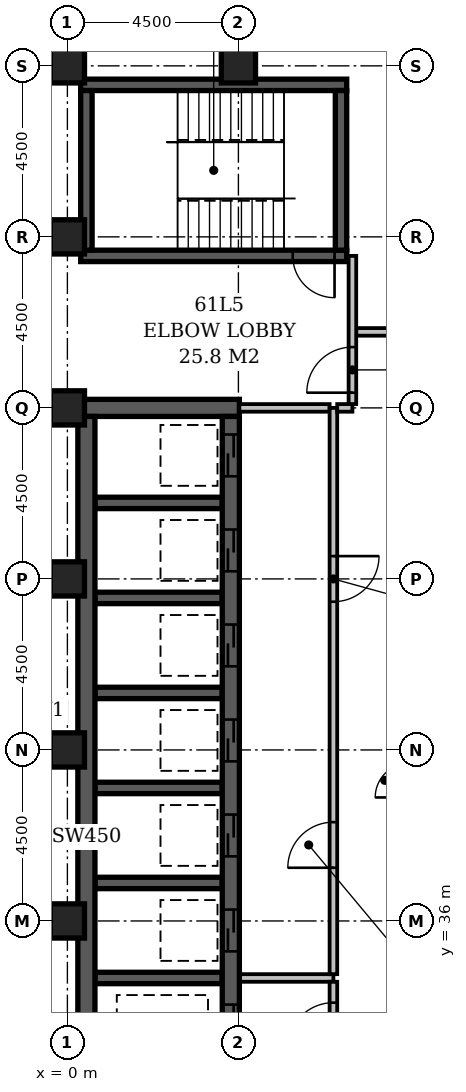
"""IFC4 building model, lengths in metres.
Left out: names, types, materials, properties, quantities, classifications, styles, units other than length and angle.
Written with IfcOpenShell. Run it as: python <this file> out.ifc"""

import sys

from ifc_helpers import new_model, si_unit, direction, frame, frame_2d, origin, origin_2d, place, context, subcontext, project, spatial, rectangle, extrude, element, fill, save


model = new_model("IFC4")
c1 = context("Model", 3, precision=1e-05, world=origin(), true_north=direction((0.0, 1.0)))
c2 = subcontext(c1, "Body", "Model", "MODEL_VIEW")
j1 = project(units=[si_unit("LENGTHUNIT", "METRE"), si_unit("PLANEANGLEUNIT", "RADIAN")], contexts=[c1])
p1 = place(None, origin())
s1 = spatial("IfcSite", under=j1, at=p1, CompositionType="ELEMENT")
p2 = place(p1, origin())
s2 = spatial("IfcBuilding", under=s1, at=p2, CompositionType="ELEMENT")
p3 = place(p2, frame((0.0, 0.0, 236.6)))
s3 = spatial("IfcBuildingStorey", under=s2, at=p3, CompositionType="ELEMENT", Elevation=236.6)
p4 = place(p3, frame((0.275, 49.5, -0.3), z_axis=(0.0, 0.0, 1.0), x_axis=(1.0, 0.0, 0.0)))
e1 = element("IfcWall", 1, at=p4, inside=s3, PredefinedType="SHEAR", context=c2, shape_type="SweptSolid", body=[
    extrude(rectangle(XDim=4.25, YDim=0.45, at=frame_2d((2.125, 0.0))), origin(), (0.0, 0.0, 1.0), 3.6),
])
p5 = place(p3, frame((0.35, 53.5, -0.3), z_axis=(0.0, 0.0, 1.0), x_axis=(1.0, 0.0, 0.0)))
e2 = element("IfcWall", 2, at=p5, inside=s3, PredefinedType="SHEAR", context=c2, shape_type="SweptSolid", body=[
    extrude(rectangle(XDim=7.0, YDim=0.3, at=frame_2d((3.5, 0.0))), origin(), (0.0, 0.0, 1.0), 3.6),
])
p6 = place(p5, frame((5.58, 0.0, 0.3)))
e3 = element("IfcOpeningElement", 3, at=p6, cuts=e2, PredefinedType="OPENING", context=c2, shape_type="SweptSolid", body=[
    extrude(rectangle(XDim=1.1, YDim=2.1, at=frame_2d((0.55, 1.05))), frame((0.0, 0.162, 0.0), z_axis=(0.0, -1.0, 0.0), x_axis=(1.0, 0.0, 0.0)), (0.0, 0.0, 1.0), 0.324),
])
p7 = place(p3, frame((0.35, 58.0, -0.3), z_axis=(0.0, 0.0, 1.0), x_axis=(1.0, 0.0, 0.0)))
e4 = element("IfcWall", 4, at=p7, inside=s3, PredefinedType="SHEAR", context=c2, shape_type="SweptSolid", body=[
    extrude(rectangle(XDim=7.0, YDim=0.3, at=frame_2d((3.5, 0.0))), origin(), (0.0, 0.0, 1.0), 3.6),
])
p8 = place(p3, frame((0.5, 27.15, -0.3), z_axis=(0.0, 0.0, 1.0), x_axis=(0.0, 1.0, 0.0)))
e5 = element("IfcWall", 5, at=p8, inside=s3, PredefinedType="SHEAR", context=c2, shape_type="SweptSolid", body=[
    extrude(rectangle(XDim=22.125, YDim=0.45, at=frame_2d((11.062, 0.0))), origin(), (0.0, 0.0, 1.0), 3.6),
])
p9 = place(p3, frame((0.5, 53.65, -0.3), z_axis=(0.0, 0.0, 1.0), x_axis=(0.0, 1.0, 0.0)))
e6 = element("IfcWall", 6, at=p9, inside=s3, PredefinedType="SHEAR", context=c2, shape_type="SweptSolid", body=[
    extrude(rectangle(XDim=4.2, YDim=0.3, at=frame_2d((2.1, 0.0))), origin(), (0.0, 0.0, 1.0), 3.6),
])
for number, where, z_axis, x_axis in (
    (7, (0.725, 34.5, -0.3), (0.0, 0.0, 1.0), (1.0, 0.0, 0.0)),
    (8, (0.725, 37.0, -0.3), (0.0, 0.0, 1.0), (1.0, 0.0, 0.0)),
    (9, (0.725, 39.5, -0.3), (0.0, 0.0, 1.0), (1.0, 0.0, 0.0)),
    (10, (0.725, 42.0, -0.3), (0.0, 0.0, 1.0), (1.0, 0.0, 0.0)),
    (11, (0.725, 44.5, -0.3), (0.0, 0.0, 1.0), (1.0, 0.0, 0.0)),
    (12, (0.725, 47.0, -0.3), (0.0, 0.0, 1.0), (1.0, 0.0, 0.0)),
):
    element("IfcWall", number, at=place(p3, frame(where, z_axis=z_axis, x_axis=x_axis)), inside=s3, PredefinedType="SHEAR", context=c2, shape_type="SweptSolid", body=[
        extrude(rectangle(XDim=3.35, YDim=0.3, at=frame_2d((1.675, 0.0))), origin(), (0.0, 0.0, 1.0), 3.6),
    ])
p10 = place(p3, frame((4.3, 27.15, -0.3), z_axis=(0.0, 0.0, 1.0), x_axis=(0.0, 1.0, 0.0)))
e13 = element("IfcWall", 13, at=p10, inside=s3, PredefinedType="SHEAR", context=c2, shape_type="SweptSolid", body=[
    extrude(rectangle(XDim=22.125, YDim=0.45, at=frame_2d((11.062, 0.0))), origin(), (0.0, 0.0, 1.0), 3.6),
])
p11 = place(p10, frame((3.05, 0.0, 0.3)))
e14 = element("IfcOpeningElement", 14, at=p11, cuts=e13, PredefinedType="OPENING", context=c2, shape_type="SweptSolid", body=[
    extrude(rectangle(XDim=1.1, YDim=2.1, at=frame_2d((0.55, 1.05))), frame((0.0, 0.237, 0.0), z_axis=(0.0, -1.0, 0.0), x_axis=(1.0, 0.0, 0.0)), (0.0, 0.0, 1.0), 0.474),
])
p12 = place(p10, frame((0.55, 0.0, 0.3)))
e15 = element("IfcOpeningElement", 15, at=p12, cuts=e13, PredefinedType="OPENING", context=c2, shape_type="SweptSolid", body=[
    extrude(rectangle(XDim=1.1, YDim=2.1, at=frame_2d((0.55, 1.05))), frame((0.0, 0.237, 0.0), z_axis=(0.0, -1.0, 0.0), x_axis=(1.0, 0.0, 0.0)), (0.0, 0.0, 1.0), 0.474),
])
p13 = place(p10, frame((20.55, 0.0, 0.3)))
e16 = element("IfcOpeningElement", 16, at=p13, cuts=e13, PredefinedType="OPENING", context=c2, shape_type="SweptSolid", body=[
    extrude(rectangle(XDim=1.1, YDim=2.1, at=frame_2d((0.55, 1.05))), frame((0.0, 0.237, 0.0), z_axis=(0.0, -1.0, 0.0), x_axis=(1.0, 0.0, 0.0)), (0.0, 0.0, 1.0), 0.474),
])
p14 = place(p10, frame((18.05, 0.0, 0.3)))
e17 = element("IfcOpeningElement", 17, at=p14, cuts=e13, PredefinedType="OPENING", context=c2, shape_type="SweptSolid", body=[
    extrude(rectangle(XDim=1.1, YDim=2.1, at=frame_2d((0.55, 1.05))), frame((0.0, 0.237, 0.0), z_axis=(0.0, -1.0, 0.0), x_axis=(1.0, 0.0, 0.0)), (0.0, 0.0, 1.0), 0.474),
])
p15 = place(p10, frame((15.55, 0.0, 0.3)))
e18 = element("IfcOpeningElement", 18, at=p15, cuts=e13, PredefinedType="OPENING", context=c2, shape_type="SweptSolid", body=[
    extrude(rectangle(XDim=1.1, YDim=2.1, at=frame_2d((0.55, 1.05))), frame((0.0, 0.237, 0.0), z_axis=(0.0, -1.0, 0.0), x_axis=(1.0, 0.0, 0.0)), (0.0, 0.0, 1.0), 0.474),
])
p16 = place(p10, frame((13.05, 0.0, 0.3)))
e19 = element("IfcOpeningElement", 19, at=p16, cuts=e13, PredefinedType="OPENING", context=c2, shape_type="SweptSolid", body=[
    extrude(rectangle(XDim=1.1, YDim=2.1, at=frame_2d((0.55, 1.05))), frame((0.0, 0.237, 0.0), z_axis=(0.0, -1.0, 0.0), x_axis=(1.0, 0.0, 0.0)), (0.0, 0.0, 1.0), 0.474),
])
p17 = place(p10, frame((10.55, 0.0, 0.3)))
e20 = element("IfcOpeningElement", 20, at=p17, cuts=e13, PredefinedType="OPENING", context=c2, shape_type="SweptSolid", body=[
    extrude(rectangle(XDim=1.1, YDim=2.1, at=frame_2d((0.55, 1.05))), frame((0.0, 0.237, 0.0), z_axis=(0.0, -1.0, 0.0), x_axis=(1.0, 0.0, 0.0)), (0.0, 0.0, 1.0), 0.474),
])
p18 = place(p10, frame((8.05, 0.0, 0.3)))
e21 = element("IfcOpeningElement", 21, at=p18, cuts=e13, PredefinedType="OPENING", context=c2, shape_type="SweptSolid", body=[
    extrude(rectangle(XDim=1.1, YDim=2.1, at=frame_2d((0.55, 1.05))), frame((0.0, 0.237, 0.0), z_axis=(0.0, -1.0, 0.0), x_axis=(1.0, 0.0, 0.0)), (0.0, 0.0, 1.0), 0.474),
])
p19 = place(p10, frame((5.55, 0.0, 0.3)))
e22 = element("IfcOpeningElement", 22, at=p19, cuts=e13, PredefinedType="OPENING", context=c2, shape_type="SweptSolid", body=[
    extrude(rectangle(XDim=1.1, YDim=2.1, at=frame_2d((0.55, 1.05))), frame((0.0, 0.237, 0.0), z_axis=(0.0, -1.0, 0.0), x_axis=(1.0, 0.0, 0.0)), (0.0, 0.0, 1.0), 0.474),
])
p20 = place(p3, frame((7.2, 53.65, -0.3), z_axis=(0.0, 0.0, 1.0), x_axis=(0.0, 1.0, 0.0)))
e23 = element("IfcWall", 23, at=p20, inside=s3, PredefinedType="SHEAR", context=c2, shape_type="SweptSolid", body=[
    extrude(rectangle(XDim=4.2, YDim=0.3, at=frame_2d((2.1, 0.0))), origin(), (0.0, 0.0, 1.0), 3.6),
])
for number, where, z_axis, x_axis in (
    (24, (0.0, 36.0, -0.3), (0.0, 0.0, 1.0), (1.0, 0.0, 0.0)),
    (25, (0.0, 40.5, -0.3), (0.0, 0.0, 1.0), (1.0, 0.0, 0.0)),
    (26, (0.0, 45.0, -0.3), (0.0, 0.0, 1.0), (1.0, 0.0, 0.0)),
    (27, (0.0, 49.5, -0.3), (0.0, 0.0, 1.0), (1.0, 0.0, 0.0)),
    (28, (0.0, 54.0, -0.3), (0.0, 0.0, 1.0), (1.0, 0.0, 0.0)),
    (29, (0.0, 58.5, -0.3), (0.0, 0.0, 1.0), (1.0, 0.0, 0.0)),
    (30, (4.5, 58.5, -0.3), (0.0, 0.0, 1.0), (1.0, 0.0, 0.0)),
):
    element("IfcColumn", number, at=place(p3, frame(where, z_axis=z_axis, x_axis=x_axis)), inside=s3, PredefinedType="COLUMN", context=c2, shape_type="SweptSolid", body=[
        extrude(rectangle(XDim=0.9, YDim=0.9, at=origin_2d()), origin(), (0.0, 0.0, 1.0), 3.6),
    ])
p21 = place(p3, frame((4.545, 34.5, 0.0), z_axis=(0.0, 0.0, 1.0), x_axis=(1.0, 0.0, 0.0)))
e31 = element("IfcWall", 31, at=p21, inside=s3, PredefinedType="PARTITIONING", context=c2, shape_type="SweptSolid", body=[
    extrude(rectangle(XDim=2.455, YDim=0.2, at=frame_2d((1.228, 0.0))), origin(), (0.0, 0.0, 1.0), 3.3),
])
p22 = place(p3, frame((7.0, 34.6, 0.0), z_axis=(0.0, 0.0, 1.0), x_axis=(0.0, 1.0, 0.0)))
e32 = element("IfcWall", 32, at=p22, inside=s3, PredefinedType="PARTITIONING", context=c2, shape_type="SweptSolid", body=[
    extrude(rectangle(XDim=14.9, YDim=0.2, at=frame_2d((7.45, 0.0))), origin(), (0.0, 0.0, 1.0), 3.3),
])
p23 = place(p22, frame((2.8, 0.0, 0.0)))
e33 = element("IfcOpeningElement", 33, at=p23, cuts=e32, PredefinedType="OPENING", context=c2, shape_type="SweptSolid", body=[
    extrude(rectangle(XDim=1.2, YDim=2.1, at=frame_2d((0.6, 1.05))), frame((0.0, 0.112, 0.0), z_axis=(0.0, -1.0, 0.0), x_axis=(1.0, 0.0, 0.0)), (0.0, 0.0, 1.0), 0.224),
])
p24 = place(p22, frame((9.8, 0.0, 0.0)))
e34 = element("IfcOpeningElement", 34, at=p24, cuts=e32, PredefinedType="OPENING", context=c2, shape_type="SweptSolid", body=[
    extrude(rectangle(XDim=1.2, YDim=2.1, at=frame_2d((0.6, 1.05))), frame((0.0, 0.112, 0.0), z_axis=(0.0, -1.0, 0.0), x_axis=(1.0, 0.0, 0.0)), (0.0, 0.0, 1.0), 0.224),
])
p25 = place(p3, frame((4.525, 49.5, 0.0), z_axis=(0.0, 0.0, 1.0), x_axis=(1.0, 0.0, 0.0)))
e35 = element("IfcWall", 35, at=p25, inside=s3, PredefinedType="PARTITIONING", context=c2, shape_type="SweptSolid", body=[
    extrude(rectangle(XDim=2.375, YDim=0.2, at=frame_2d((1.188, 0.0))), origin(), (0.0, 0.0, 1.0), 3.3),
])
p26 = place(p3, frame((7.0, 32.1, 0.0), z_axis=(0.0, 0.0, 1.0), x_axis=(0.0, 1.0, 0.0)))
e36 = element("IfcWall", 36, at=p26, inside=s3, PredefinedType="PARTITIONING", context=c2, shape_type="SweptSolid", body=[
    extrude(rectangle(XDim=2.3, YDim=0.2, at=frame_2d((1.15, 0.0))), origin(), (0.0, 0.0, 1.0), 3.3),
])
p27 = place(p26, frame((0.55, 0.0, 0.0)))
e37 = element("IfcOpeningElement", 37, at=p27, cuts=e36, PredefinedType="OPENING", context=c2, shape_type="SweptSolid", body=[
    extrude(rectangle(XDim=1.2, YDim=2.1, at=frame_2d((0.6, 1.05))), frame((0.0, 0.112, 0.0), z_axis=(0.0, -1.0, 0.0), x_axis=(1.0, 0.0, 0.0)), (0.0, 0.0, 1.0), 0.224),
])
p28 = place(p3, frame((7.1, 49.5, 0.0), z_axis=(0.0, 0.0, 1.0), x_axis=(1.0, 0.0, 0.0)))
e38 = element("IfcWall", 38, at=p28, inside=s3, PredefinedType="PARTITIONING", context=c2, shape_type="SweptSolid", body=[
    extrude(rectangle(XDim=0.4, YDim=0.2, at=frame_2d((0.2, 0.0))), origin(), (0.0, 0.0, 1.0), 3.3),
])
p29 = place(p3, frame((7.5, 49.6, 0.0), z_axis=(0.0, 0.0, 1.0), x_axis=(0.0, 1.0, 0.0)))
e39 = element("IfcWall", 39, at=p29, inside=s3, PredefinedType="PARTITIONING", context=c2, shape_type="SweptSolid", body=[
    extrude(rectangle(XDim=3.9, YDim=0.2, at=frame_2d((1.95, 0.0))), origin(), (0.0, 0.0, 1.0), 3.3),
])
p30 = place(p29, frame((0.3, 0.0, 0.0)))
e40 = element("IfcOpeningElement", 40, at=p30, cuts=e39, PredefinedType="OPENING", context=c2, shape_type="SweptSolid", body=[
    extrude(rectangle(XDim=1.2, YDim=2.1, at=frame_2d((0.6, 1.05))), frame((0.0, 0.112, 0.0), z_axis=(0.0, -1.0, 0.0), x_axis=(1.0, 0.0, 0.0)), (0.0, 0.0, 1.0), 0.224),
])
p31 = place(p3, frame((7.6, 51.5, 0.0), z_axis=(0.0, 0.0, 1.0), x_axis=(1.0, 0.0, 0.0)))
e41 = element("IfcWall", 41, at=p31, inside=s3, PredefinedType="PARTITIONING", context=c2, shape_type="SweptSolid", body=[
    extrude(rectangle(XDim=15.3, YDim=0.2, at=frame_2d((7.65, 0.0))), origin(), (0.0, 0.0, 1.0), 3.3),
])
p32 = place(p31, frame((7.2, 0.0, 0.0)))
e42 = element("IfcOpeningElement", 42, at=p32, cuts=e41, PredefinedType="OPENING", context=c2, shape_type="SweptSolid", body=[
    extrude(rectangle(XDim=0.9, YDim=2.1, at=frame_2d((0.45, 1.05))), frame((0.0, 0.112, 0.0), z_axis=(0.0, -1.0, 0.0), x_axis=(1.0, 0.0, 0.0)), (0.0, 0.0, 1.0), 0.224),
])
p33 = place(p30, origin())
e43 = element("IfcDoor", 43, at=p33, inside=s3, OperationType="SINGLE_SWING_LEFT", PredefinedType="DOOR", context=c2, shape_type="SweptSolid", body=[
    extrude(rectangle(XDim=1.2, YDim=2.1, at=frame_2d((0.6, 1.05))), frame((0.0, 0.025, 0.0), z_axis=(0.0, -1.0, 0.0), x_axis=(1.0, 0.0, 0.0)), (0.0, 0.0, 1.0), 0.05),
])
fill(e40, e43)
p34 = place(p13, origin())
e44 = element("IfcDoor", 44, at=p34, inside=s3, OperationType="SLIDING_TO_LEFT", PredefinedType="DOOR", context=c2, shape_type="SweptSolid", body=[
    extrude(rectangle(XDim=1.1, YDim=2.1, at=frame_2d((0.55, 1.05))), frame((0.0, 0.025, 0.0), z_axis=(0.0, -1.0, 0.0), x_axis=(1.0, 0.0, 0.0)), (0.0, 0.0, 1.0), 0.05),
])
fill(e16, e44)
p35 = place(p14, origin())
e45 = element("IfcDoor", 45, at=p35, inside=s3, OperationType="SLIDING_TO_LEFT", PredefinedType="DOOR", context=c2, shape_type="SweptSolid", body=[
    extrude(rectangle(XDim=1.1, YDim=2.1, at=frame_2d((0.55, 1.05))), frame((0.0, 0.025, 0.0), z_axis=(0.0, -1.0, 0.0), x_axis=(1.0, 0.0, 0.0)), (0.0, 0.0, 1.0), 0.05),
])
fill(e17, e45)
p36 = place(p15, origin())
e46 = element("IfcDoor", 46, at=p36, inside=s3, OperationType="SLIDING_TO_LEFT", PredefinedType="DOOR", context=c2, shape_type="SweptSolid", body=[
    extrude(rectangle(XDim=1.1, YDim=2.1, at=frame_2d((0.55, 1.05))), frame((0.0, 0.025, 0.0), z_axis=(0.0, -1.0, 0.0), x_axis=(1.0, 0.0, 0.0)), (0.0, 0.0, 1.0), 0.05),
])
fill(e18, e46)
p37 = place(p16, origin())
e47 = element("IfcDoor", 47, at=p37, inside=s3, OperationType="SLIDING_TO_LEFT", PredefinedType="DOOR", context=c2, shape_type="SweptSolid", body=[
    extrude(rectangle(XDim=1.1, YDim=2.1, at=frame_2d((0.55, 1.05))), frame((0.0, 0.025, 0.0), z_axis=(0.0, -1.0, 0.0), x_axis=(1.0, 0.0, 0.0)), (0.0, 0.0, 1.0), 0.05),
])
fill(e19, e47)
p38 = place(p17, origin())
e48 = element("IfcDoor", 48, at=p38, inside=s3, OperationType="SLIDING_TO_LEFT", PredefinedType="DOOR", context=c2, shape_type="SweptSolid", body=[
    extrude(rectangle(XDim=1.1, YDim=2.1, at=frame_2d((0.55, 1.05))), frame((0.0, 0.025, 0.0), z_axis=(0.0, -1.0, 0.0), x_axis=(1.0, 0.0, 0.0)), (0.0, 0.0, 1.0), 0.05),
])
fill(e20, e48)
p39 = place(p18, origin())
e49 = element("IfcDoor", 49, at=p39, inside=s3, OperationType="SLIDING_TO_LEFT", PredefinedType="DOOR", context=c2, shape_type="SweptSolid", body=[
    extrude(rectangle(XDim=1.1, YDim=2.1, at=frame_2d((0.55, 1.05))), frame((0.0, 0.025, 0.0), z_axis=(0.0, -1.0, 0.0), x_axis=(1.0, 0.0, 0.0)), (0.0, 0.0, 1.0), 0.05),
])
fill(e21, e49)
p40 = place(p23, origin())
e50 = element("IfcDoor", 50, at=p40, inside=s3, OperationType="SINGLE_SWING_LEFT", PredefinedType="DOOR", context=c2, shape_type="SweptSolid", body=[
    extrude(rectangle(XDim=1.2, YDim=2.1, at=frame_2d((0.6, 1.05))), frame((0.0, 0.025, 0.0), z_axis=(0.0, -1.0, 0.0), x_axis=(1.0, 0.0, 0.0)), (0.0, 0.0, 1.0), 0.05),
])
fill(e33, e50)
p41 = place(p24, origin())
e51 = element("IfcDoor", 51, at=p41, inside=s3, OperationType="SINGLE_SWING_RIGHT", PredefinedType="DOOR", context=c2, shape_type="SweptSolid", body=[
    extrude(rectangle(XDim=1.2, YDim=2.1, at=frame_2d((0.6, 1.05))), frame((0.0, 0.025, 0.0), z_axis=(0.0, -1.0, 0.0), x_axis=(1.0, 0.0, 0.0)), (0.0, 0.0, 1.0), 0.05),
])
fill(e34, e51)
p42 = place(p27, origin())
e52 = element("IfcDoor", 52, at=p42, inside=s3, OperationType="SINGLE_SWING_LEFT", PredefinedType="DOOR", context=c2, shape_type="SweptSolid", body=[
    extrude(rectangle(XDim=1.2, YDim=2.1, at=frame_2d((0.6, 1.05))), frame((0.0, 0.025, 0.0), z_axis=(0.0, -1.0, 0.0), x_axis=(1.0, 0.0, 0.0)), (0.0, 0.0, 1.0), 0.05),
])
fill(e37, e52)
p43 = place(p19, origin())
e53 = element("IfcDoor", 53, at=p43, inside=s3, OperationType="SLIDING_TO_LEFT", PredefinedType="DOOR", context=c2, shape_type="SweptSolid", body=[
    extrude(rectangle(XDim=1.1, YDim=2.1, at=frame_2d((0.55, 1.05))), frame((0.0, 0.025, 0.0), z_axis=(0.0, -1.0, 0.0), x_axis=(1.0, 0.0, 0.0)), (0.0, 0.0, 1.0), 0.05),
])
fill(e22, e53)
p44 = place(p6, origin())
e54 = element("IfcDoor", 54, at=p44, inside=s3, OperationType="SINGLE_SWING_RIGHT", PredefinedType="DOOR", context=c2, shape_type="SweptSolid", body=[
    extrude(rectangle(XDim=1.1, YDim=2.1, at=frame_2d((0.55, 1.05))), frame((0.0, 0.025, 0.0), z_axis=(0.0, -1.0, 0.0), x_axis=(1.0, 0.0, 0.0)), (0.0, 0.0, 1.0), 0.05),
])
fill(e3, e54)
save(model, sys.argv[1])
